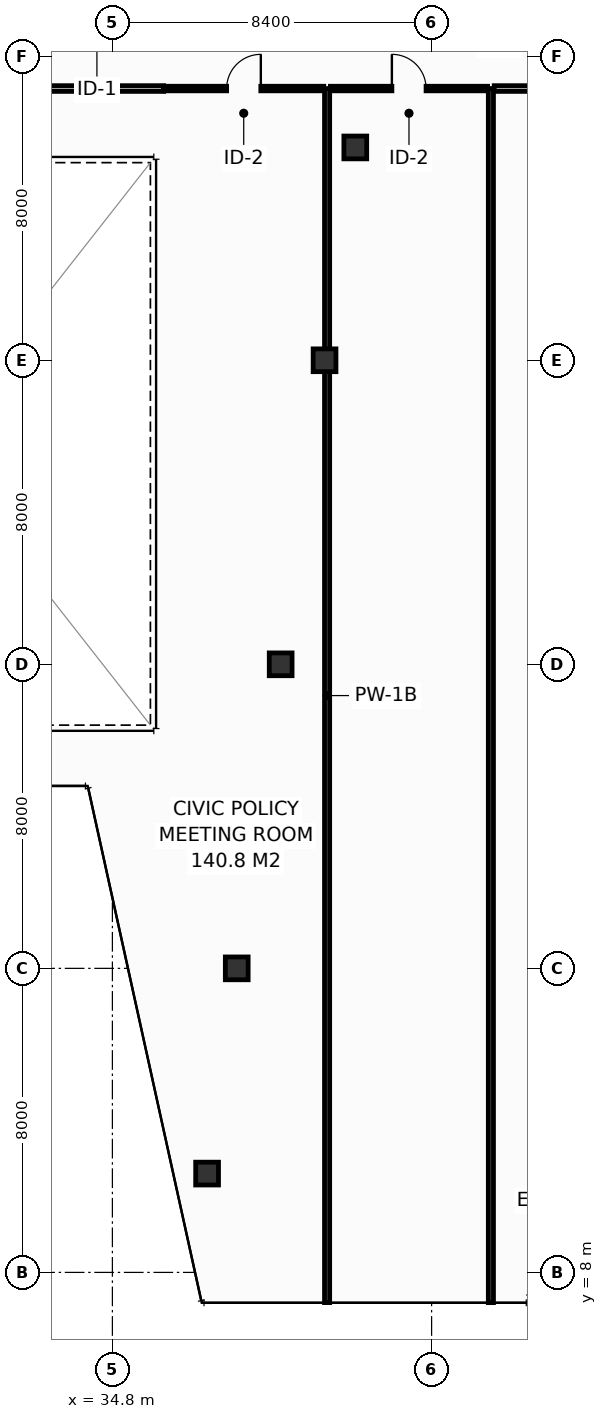
"""IFC4 building model, lengths in metres.
Left out: names, types, materials, properties, quantities, classifications, styles, units other than length and angle.
Written with IfcOpenShell. Run it as: python <this file> out.ifc"""

import sys

from ifc_helpers import new_model, si_unit, direction, frame, frame_2d, origin, origin_2d, place, context, subcontext, project, spatial, rectangle, hollow_rectangle, extrude, element, fill, save


model = new_model("IFC4")
c1 = context("Model", 3, precision=1e-05, world=origin(), true_north=direction((0.0, 1.0)))
c2 = subcontext(c1, "Body", "Model", "MODEL_VIEW")
j1 = project(units=[si_unit("LENGTHUNIT", "METRE"), si_unit("PLANEANGLEUNIT", "RADIAN")], contexts=[c1])
p1 = place(None, origin())
s1 = spatial("IfcSite", under=j1, at=p1, CompositionType="ELEMENT")
p2 = place(p1, origin())
s2 = spatial("IfcBuilding", under=s1, at=p2, CompositionType="ELEMENT")
p3 = place(p2, frame((0.0, 0.0, 141.0)))
s3 = spatial("IfcBuildingStorey", under=s2, at=p3, CompositionType="ELEMENT", Elevation=141.0)
for number, where, z_axis, x_axis in (
    (1, (37.292, 10.6, 0.0), (0.0, 0.0, 1.0), (1.0, 0.0, 0.0)),
    (2, (38.072, 16.0, 0.0), (0.0, 0.0, 1.0), (1.0, 0.0, 0.0)),
    (3, (39.228, 24.0, 0.0), (0.0, 0.0, 1.0), (1.0, 0.0, 0.0)),
    (4, (40.383, 32.0, 0.0), (0.0, 0.0, 1.0), (1.0, 0.0, 0.0)),
    (5, (41.192, 37.6, 0.0), (0.0, 0.0, 1.0), (1.0, 0.0, 0.0)),
):
    element("IfcColumn", number, at=place(p3, frame(where, z_axis=z_axis, x_axis=x_axis)), inside=s3, PredefinedType="COLUMN", context=c2, shape_type="SweptSolid", body=[
        extrude(hollow_rectangle(XDim=0.6, YDim=0.6, WallThickness=0.028, at=origin_2d()), origin(), (0.0, 0.0, 1.0), 3.8),
    ])
for number, where, z_axis, x_axis in (
    (6, (40.45, 7.205, 0.0), (0.0, 0.0, 1.0), (0.0, 1.0, 0.0)),
    (7, (44.76, 7.205, 0.0), (0.0, 0.0, 1.0), (0.0, 1.0, 0.0)),
):
    element("IfcWall", number, at=place(p3, frame(where, z_axis=z_axis, x_axis=x_axis)), inside=s3, PredefinedType="PARTITIONING", context=c2, shape_type="SweptSolid", body=[
        extrude(rectangle(XDim=31.945, YDim=0.135, at=frame_2d((15.972, 0.0))), origin(), (0.0, 0.0, 1.0), 2.835),
    ])
p4 = place(p3, frame((23.85, 39.15, 0.0), z_axis=(0.0, 0.0, 1.0), x_axis=(1.0, 0.0, 0.0)))
e8 = element("IfcWall", 8, at=p4, inside=s3, PredefinedType="PARTITIONING", context=c2, shape_type="SweptSolid", body=[
    extrude(rectangle(XDim=12.3, YDim=0.15, at=frame_2d((6.15, 0.0))), origin(), (0.0, 0.0, 1.0), 3.55),
])
p5 = place(p3, frame((36.15, 39.15, 0.0), z_axis=(0.0, 0.0, 1.0), x_axis=(1.0, 0.0, 0.0)))
e9 = element("IfcWall", 9, at=p5, inside=s3, PredefinedType="PARTITIONING", context=c2, shape_type="SweptSolid", body=[
    extrude(rectangle(XDim=4.213, YDim=0.12, at=frame_2d((2.106, 0.0))), origin(), (0.0, 0.0, 1.0), 2.835),
])
p6 = place(p5, frame((1.656, 0.0, 0.0)))
e10 = element("IfcOpeningElement", 10, at=p6, cuts=e9, PredefinedType="OPENING", context=c2, shape_type="SweptSolid", body=[
    extrude(rectangle(XDim=0.9, YDim=2.1, at=frame_2d((0.45, 1.05))), frame((0.0, 0.07, 0.0), z_axis=(0.0, -1.0, 0.0), x_axis=(1.0, 0.0, 0.0)), (0.0, 0.0, 1.0), 0.14),
])
p7 = place(p3, frame((40.538, 39.15, 0.0), z_axis=(0.0, 0.0, 1.0), x_axis=(1.0, 0.0, 0.0)))
e11 = element("IfcWall", 11, at=p7, inside=s3, PredefinedType="PARTITIONING", context=c2, shape_type="SweptSolid", body=[
    extrude(rectangle(XDim=4.135, YDim=0.12, at=frame_2d((2.067, 0.0))), origin(), (0.0, 0.0, 1.0), 3.55),
])
p8 = place(p7, frame((1.617, 0.0, 0.0)))
e12 = element("IfcOpeningElement", 12, at=p8, cuts=e11, PredefinedType="OPENING", context=c2, shape_type="SweptSolid", body=[
    extrude(rectangle(XDim=0.9, YDim=2.1, at=frame_2d((0.45, 1.05))), frame((0.0, 0.07, 0.0), z_axis=(0.0, -1.0, 0.0), x_axis=(1.0, 0.0, 0.0)), (0.0, 0.0, 1.0), 0.14),
])
p9 = place(p3, frame((44.847, 39.15, 0.0), z_axis=(0.0, 0.0, 1.0), x_axis=(1.0, 0.0, 0.0)))
e13 = element("IfcWall", 13, at=p9, inside=s3, PredefinedType="PARTITIONING", context=c2, shape_type="SweptSolid", body=[
    extrude(rectangle(XDim=4.125, YDim=0.15, at=frame_2d((2.062, 0.0))), origin(), (0.0, 0.0, 1.0), 3.55),
])
p10 = place(p9, frame((1.538, 0.0, 0.0)))
e14 = element("IfcOpeningElement", 14, at=p10, cuts=e13, PredefinedType="OPENING", context=c2, shape_type="SweptSolid", body=[
    extrude(rectangle(XDim=1.05, YDim=2.15, at=frame_2d((0.525, 1.075))), frame((0.0, 0.085, 0.0), z_axis=(0.0, -1.0, 0.0), x_axis=(1.0, 0.0, 0.0)), (0.0, 0.0, 1.0), 0.17),
])
p11 = place(p6, origin())
e15 = element("IfcDoor", 15, at=p11, inside=s3, OperationType="SINGLE_SWING_RIGHT", PredefinedType="DOOR", context=c2, shape_type="SweptSolid", body=[
    extrude(rectangle(XDim=0.9, YDim=2.1, at=frame_2d((0.45, 1.05))), frame((0.0, 0.025, 0.0), z_axis=(0.0, -1.0, 0.0), x_axis=(1.0, 0.0, 0.0)), (0.0, 0.0, 1.0), 0.05),
])
fill(e10, e15)
p12 = place(p8, origin())
e16 = element("IfcDoor", 16, at=p12, inside=s3, OperationType="SINGLE_SWING_LEFT", PredefinedType="DOOR", context=c2, shape_type="SweptSolid", body=[
    extrude(rectangle(XDim=0.9, YDim=2.1, at=frame_2d((0.45, 1.05))), frame((0.0, 0.025, 0.0), z_axis=(0.0, -1.0, 0.0), x_axis=(1.0, 0.0, 0.0)), (0.0, 0.0, 1.0), 0.05),
])
fill(e12, e16)
save(model, sys.argv[1])
